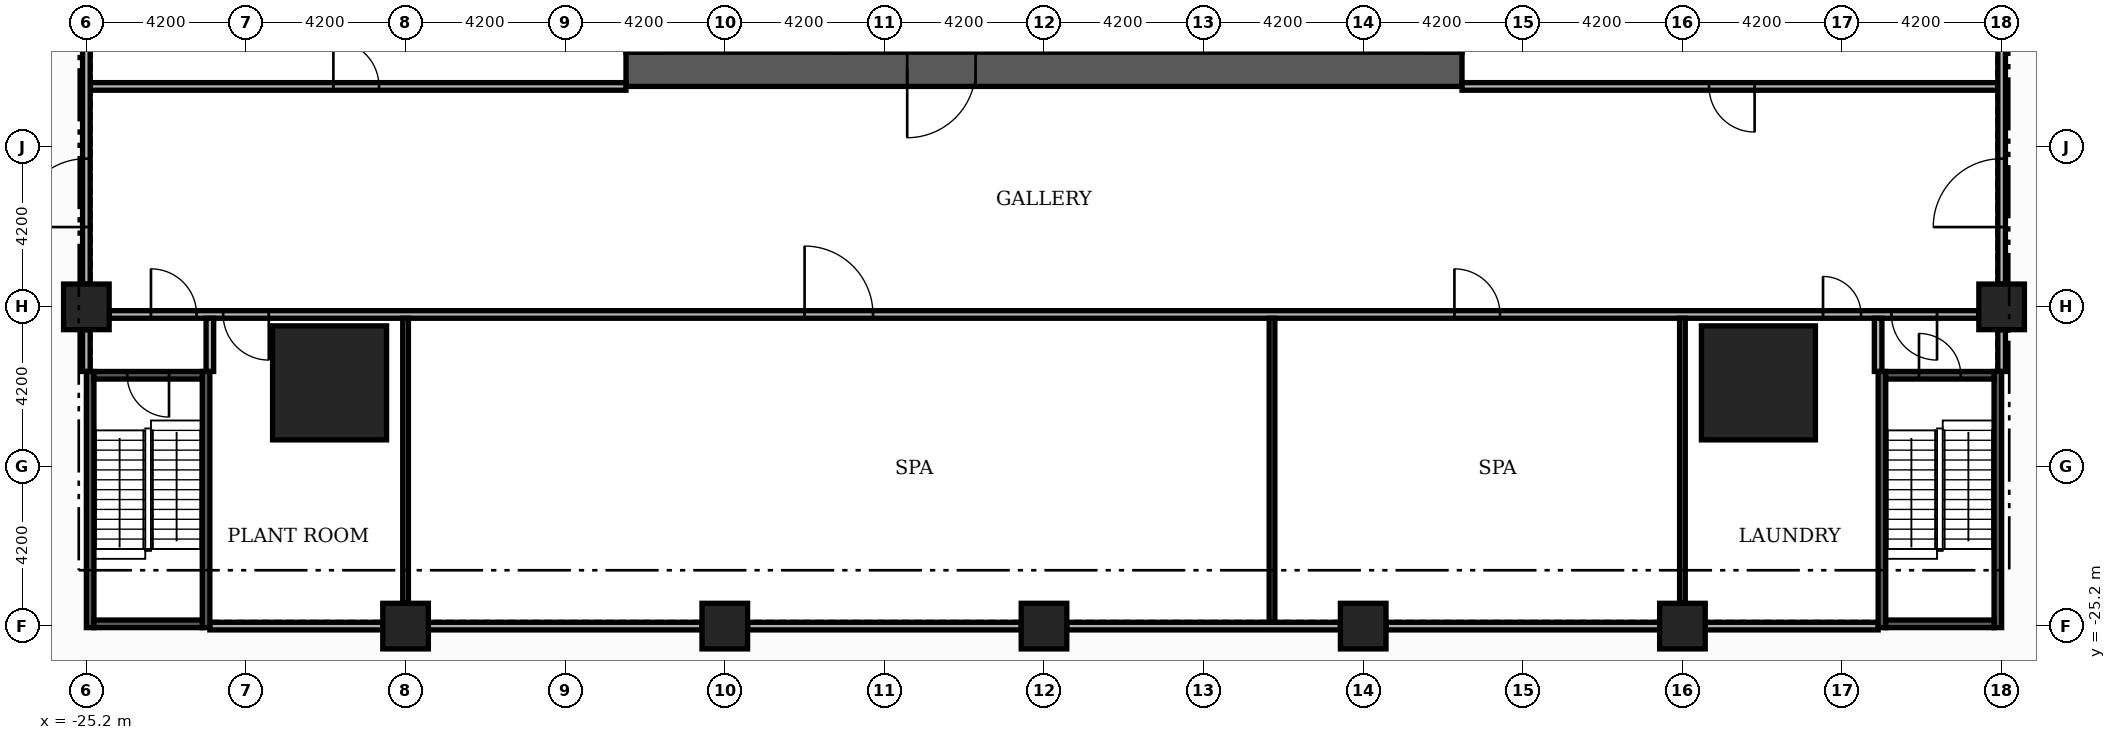
"""IFC4 building model, lengths in metres.
Left out: names, types, materials, properties, quantities, classifications, styles, units other than length and angle.
Written with IfcOpenShell. Run it as: python <this file> out.ifc"""

import sys

from ifc_helpers import new_model, si_unit, direction, frame, frame_2d, origin, origin_2d, place, context, subcontext, project, spatial, rectangle, extrude, element, fill, save


model = new_model("IFC4")
c1 = context("Model", 3, precision=1e-05, world=origin(), true_north=direction((0.0, 1.0)))
c2 = subcontext(c1, "Body", "Model", "MODEL_VIEW")
j1 = project(units=[si_unit("LENGTHUNIT", "METRE"), si_unit("PLANEANGLEUNIT", "RADIAN")], contexts=[c1])
p1 = place(None, origin())
s1 = spatial("IfcSite", under=j1, at=p1, CompositionType="ELEMENT")
p2 = place(p1, origin())
s2 = spatial("IfcBuilding", under=s1, at=p2, CompositionType="ELEMENT")
p3 = place(p2, frame((0.0, 0.0, 12.0)))
s3 = spatial("IfcBuildingStorey", under=s2, at=p3, CompositionType="ELEMENT", Elevation=12.0)
p4 = place(p3, frame((-11.0, -10.55, 0.0), z_axis=(0.0, 0.0, 1.0), x_axis=(1.0, 0.0, 0.0)))
e1 = element("IfcWall", 1, at=p4, inside=s3, PredefinedType="SHEAR", context=c2, shape_type="SweptSolid", body=[
    extrude(rectangle(XDim=22.0, YDim=0.9, at=frame_2d((11.0, 0.0))), origin(), (0.0, 0.0, 1.0), 4.38),
])
p5 = place(p4, frame((7.4, 0.0, 0.0)))
e2 = element("IfcOpeningElement", 2, at=p5, cuts=e1, PredefinedType="OPENING", context=c2, shape_type="SweptSolid", body=[
    extrude(rectangle(XDim=1.8, YDim=2.2, at=frame_2d((0.9, 1.1))), frame((0.0, 0.46, 0.0), z_axis=(0.0, -1.0, 0.0), x_axis=(1.0, 0.0, 0.0)), (0.0, 0.0, 1.0), 0.92),
])
for number, where, z_axis, x_axis in (
    (3, (18.8, -18.8, 0.0), (0.0, 0.0, 1.0), (1.0, 0.0, 0.0)),
    (4, (-18.8, -18.8, 0.0), (0.0, 0.0, 1.0), (1.0, 0.0, 0.0)),
):
    element("IfcColumn", number, at=place(p3, frame(where, z_axis=z_axis, x_axis=x_axis)), inside=s3, PredefinedType="COLUMN", context=c2, shape_type="SweptSolid", body=[
        extrude(rectangle(XDim=3.0, YDim=3.0, at=origin_2d()), origin(), (0.0, 0.0, 1.0), 4.8),
    ])
for number, where, z_axis, x_axis in (
    (5, (25.2, -16.8, 0.0), (0.0, 0.0, 1.0), (1.0, 0.0, 0.0)),
    (6, (0.0, -25.2, 0.0), (0.0, 0.0, 1.0), (1.0, 0.0, 0.0)),
    (7, (8.4, -25.2, 0.0), (0.0, 0.0, 1.0), (1.0, 0.0, 0.0)),
    (8, (16.8, -25.2, 0.0), (0.0, 0.0, 1.0), (1.0, 0.0, 0.0)),
    (9, (-8.4, -25.2, 0.0), (0.0, 0.0, 1.0), (1.0, 0.0, 0.0)),
    (10, (-16.8, -25.2, 0.0), (0.0, 0.0, 1.0), (1.0, 0.0, 0.0)),
    (11, (-25.2, -16.8, 0.0), (0.0, 0.0, 1.0), (1.0, 0.0, 0.0)),
):
    element("IfcColumn", number, at=place(p3, frame(where, z_axis=z_axis, x_axis=x_axis)), inside=s3, PredefinedType="COLUMN", context=c2, shape_type="SweptSolid", body=[
        extrude(rectangle(XDim=1.2, YDim=1.2, at=origin_2d()), origin(), (0.0, 0.0, 1.0), 4.8),
    ])
p6 = place(p3, frame((-21.95, -25.2, 0.0), z_axis=(0.0, 0.0, 1.0), x_axis=(1.0, 0.0, 0.0)))
e12 = element("IfcWall", 12, at=p6, inside=s3, PredefinedType="PARTITIONING", context=c2, shape_type="SweptSolid", body=[
    extrude(rectangle(XDim=4.55, YDim=0.2, at=frame_2d((2.275, 0.0))), origin(), (0.0, 0.0, 1.0), 4.18),
])
for number, where, z_axis, x_axis in (
    (13, (-16.2, -25.2, 0.0), (0.0, 0.0, 1.0), (1.0, 0.0, 0.0)),
    (14, (-7.8, -25.2, 0.0), (0.0, 0.0, 1.0), (1.0, 0.0, 0.0)),
    (15, (0.6, -25.2, 0.0), (0.0, 0.0, 1.0), (1.0, 0.0, 0.0)),
    (16, (9.0, -25.2, 0.0), (0.0, 0.0, 1.0), (1.0, 0.0, 0.0)),
):
    element("IfcWall", number, at=place(p3, frame(where, z_axis=z_axis, x_axis=x_axis)), inside=s3, PredefinedType="PARTITIONING", context=c2, shape_type="SweptSolid", body=[
        extrude(rectangle(XDim=7.2, YDim=0.2, at=frame_2d((3.6, 0.0))), origin(), (0.0, 0.0, 1.0), 4.18),
    ])
p7 = place(p3, frame((17.4, -25.2, 0.0), z_axis=(0.0, 0.0, 1.0), x_axis=(1.0, 0.0, 0.0)))
e17 = element("IfcWall", 17, at=p7, inside=s3, PredefinedType="PARTITIONING", context=c2, shape_type="SweptSolid", body=[
    extrude(rectangle(XDim=4.55, YDim=0.2, at=frame_2d((2.275, 0.0))), origin(), (0.0, 0.0, 1.0), 4.18),
])
p8 = place(p3, frame((-24.6, -17.0, 0.0), z_axis=(0.0, 0.0, 1.0), x_axis=(1.0, 0.0, 0.0)))
e18 = element("IfcWall", 18, at=p8, inside=s3, PredefinedType="PARTITIONING", context=c2, shape_type="SweptSolid", body=[
    extrude(rectangle(XDim=49.2, YDim=0.2, at=frame_2d((24.6, 0.0))), origin(), (0.0, 0.0, 1.0), 4.38),
])
p9 = place(p8, frame((1.1, 0.0, 0.0)))
e19 = element("IfcOpeningElement", 19, at=p9, cuts=e18, PredefinedType="OPENING", context=c2, shape_type="SweptSolid", body=[
    extrude(rectangle(XDim=1.2, YDim=2.2, at=frame_2d((0.6, 1.1))), frame((0.0, 0.11, 0.0), z_axis=(0.0, -1.0, 0.0), x_axis=(1.0, 0.0, 0.0)), (0.0, 0.0, 1.0), 0.22),
])
p10 = place(p8, frame((3.0, 0.0, 0.0)))
e20 = element("IfcOpeningElement", 20, at=p10, cuts=e18, PredefinedType="OPENING", context=c2, shape_type="SweptSolid", body=[
    extrude(rectangle(XDim=1.2, YDim=2.2, at=frame_2d((0.6, 1.1))), frame((0.0, 0.11, 0.0), z_axis=(0.0, -1.0, 0.0), x_axis=(1.0, 0.0, 0.0)), (0.0, 0.0, 1.0), 0.22),
])
p11 = place(p8, frame((18.3, 0.0, 0.0)))
e21 = element("IfcOpeningElement", 21, at=p11, cuts=e18, PredefinedType="OPENING", context=c2, shape_type="SweptSolid", body=[
    extrude(rectangle(XDim=1.8, YDim=2.2, at=frame_2d((0.9, 1.1))), frame((0.0, 0.11, 0.0), z_axis=(0.0, -1.0, 0.0), x_axis=(1.0, 0.0, 0.0)), (0.0, 0.0, 1.0), 0.22),
])
p12 = place(p8, frame((35.4, 0.0, 0.0)))
e22 = element("IfcOpeningElement", 22, at=p12, cuts=e18, PredefinedType="OPENING", context=c2, shape_type="SweptSolid", body=[
    extrude(rectangle(XDim=1.2, YDim=2.2, at=frame_2d((0.6, 1.1))), frame((0.0, 0.11, 0.0), z_axis=(0.0, -1.0, 0.0), x_axis=(1.0, 0.0, 0.0)), (0.0, 0.0, 1.0), 0.22),
])
p13 = place(p8, frame((45.1, 0.0, 0.0)))
e23 = element("IfcOpeningElement", 23, at=p13, cuts=e18, PredefinedType="OPENING", context=c2, shape_type="SweptSolid", body=[
    extrude(rectangle(XDim=1.0, YDim=2.1, at=frame_2d((0.5, 1.05))), frame((0.0, 0.11, 0.0), z_axis=(0.0, -1.0, 0.0), x_axis=(1.0, 0.0, 0.0)), (0.0, 0.0, 1.0), 0.22),
])
p14 = place(p8, frame((46.9, 0.0, 0.0)))
e24 = element("IfcOpeningElement", 24, at=p14, cuts=e18, PredefinedType="OPENING", context=c2, shape_type="SweptSolid", body=[
    extrude(rectangle(XDim=1.2, YDim=2.2, at=frame_2d((0.6, 1.1))), frame((0.0, 0.11, 0.0), z_axis=(0.0, -1.0, 0.0), x_axis=(1.0, 0.0, 0.0)), (0.0, 0.0, 1.0), 0.22),
])
p15 = place(p3, frame((-25.1, -11.0, 0.0), z_axis=(0.0, 0.0, 1.0), x_axis=(1.0, 0.0, 0.0)))
e25 = element("IfcWall", 25, at=p15, inside=s3, PredefinedType="PARTITIONING", context=c2, shape_type="SweptSolid", body=[
    extrude(rectangle(XDim=14.1, YDim=0.2, at=frame_2d((7.05, 0.0))), origin(), (0.0, 0.0, 1.0), 4.38),
])
p16 = place(p15, frame((6.4, 0.0, 0.0)))
e26 = element("IfcOpeningElement", 26, at=p16, cuts=e25, PredefinedType="OPENING", context=c2, shape_type="SweptSolid", body=[
    extrude(rectangle(XDim=1.2, YDim=2.2, at=frame_2d((0.6, 1.1))), frame((0.0, 0.11, 0.0), z_axis=(0.0, -1.0, 0.0), x_axis=(1.0, 0.0, 0.0)), (0.0, 0.0, 1.0), 0.22),
])
p17 = place(p3, frame((11.0, -11.0, 0.0), z_axis=(0.0, 0.0, 1.0), x_axis=(1.0, 0.0, 0.0)))
e27 = element("IfcWall", 27, at=p17, inside=s3, PredefinedType="PARTITIONING", context=c2, shape_type="SweptSolid", body=[
    extrude(rectangle(XDim=14.1, YDim=0.2, at=frame_2d((7.05, 0.0))), origin(), (0.0, 0.0, 1.0), 4.38),
])
p18 = place(p17, frame((6.5, 0.0, 0.0)))
e28 = element("IfcOpeningElement", 28, at=p18, cuts=e27, PredefinedType="OPENING", context=c2, shape_type="SweptSolid", body=[
    extrude(rectangle(XDim=1.2, YDim=2.2, at=frame_2d((0.6, 1.1))), frame((0.0, 0.11, 0.0), z_axis=(0.0, -1.0, 0.0), x_axis=(1.0, 0.0, 0.0)), (0.0, 0.0, 1.0), 0.22),
])
p19 = place(p3, frame((-25.2, -18.5, 0.0), z_axis=(0.0, 0.0, 1.0), x_axis=(0.0, 1.0, 0.0)))
e29 = element("IfcWall", 29, at=p19, inside=s3, PredefinedType="PARTITIONING", context=c2, shape_type="SweptSolid", body=[
    extrude(rectangle(XDim=1.1, YDim=0.2, at=frame_2d((0.55, 0.0))), origin(), (0.0, 0.0, 1.0), 4.08),
])
p20 = place(p3, frame((-25.2, -16.2, 0.0), z_axis=(0.0, 0.0, 1.0), x_axis=(0.0, 1.0, 0.0)))
e30 = element("IfcWall", 30, at=p20, inside=s3, PredefinedType="PARTITIONING", context=c2, shape_type="SweptSolid", body=[
    extrude(rectangle(XDim=7.2, YDim=0.2, at=frame_2d((3.6, 0.0))), origin(), (0.0, 0.0, 1.0), 4.08),
])
p21 = place(p20, frame((1.5, 0.0, 0.0)))
e31 = element("IfcOpeningElement", 31, at=p21, cuts=e30, PredefinedType="OPENING", context=c2, shape_type="SweptSolid", body=[
    extrude(rectangle(XDim=1.8, YDim=2.2, at=frame_2d((0.9, 1.1))), frame((0.0, 0.11, 0.0), z_axis=(0.0, -1.0, 0.0), x_axis=(1.0, 0.0, 0.0)), (0.0, 0.0, 1.0), 0.22),
])
p22 = place(p3, frame((-21.95, -18.5, 0.0), z_axis=(0.0, 0.0, 1.0), x_axis=(0.0, 1.0, 0.0)))
e32 = element("IfcWall", 32, at=p22, inside=s3, PredefinedType="PARTITIONING", context=c2, shape_type="SweptSolid", body=[
    extrude(rectangle(XDim=1.4, YDim=0.2, at=frame_2d((0.7, 0.0))), origin(), (0.0, 0.0, 1.0), 4.38),
])
p23 = place(p3, frame((-16.8, -24.6, 0.0), z_axis=(0.0, 0.0, 1.0), x_axis=(0.0, 1.0, 0.0)))
e33 = element("IfcWall", 33, at=p23, inside=s3, PredefinedType="PARTITIONING", context=c2, shape_type="SweptSolid", body=[
    extrude(rectangle(XDim=7.5, YDim=0.15, at=frame_2d((3.75, 0.0))), origin(), (0.0, 0.0, 1.0), 4.38),
])
p24 = place(p3, frame((6.0, -25.1, 0.0), z_axis=(0.0, 0.0, 1.0), x_axis=(0.0, 1.0, 0.0)))
e34 = element("IfcWall", 34, at=p24, inside=s3, PredefinedType="PARTITIONING", context=c2, shape_type="SweptSolid", body=[
    extrude(rectangle(XDim=8.0, YDim=0.15, at=frame_2d((4.0, 0.0))), origin(), (0.0, 0.0, 1.0), 4.38),
])
p25 = place(p3, frame((16.8, -24.6, 0.0), z_axis=(0.0, 0.0, 1.0), x_axis=(0.0, 1.0, 0.0)))
e35 = element("IfcWall", 35, at=p25, inside=s3, PredefinedType="PARTITIONING", context=c2, shape_type="SweptSolid", body=[
    extrude(rectangle(XDim=7.5, YDim=0.15, at=frame_2d((3.75, 0.0))), origin(), (0.0, 0.0, 1.0), 4.38),
])
p26 = place(p3, frame((21.95, -18.5, 0.0), z_axis=(0.0, 0.0, 1.0), x_axis=(0.0, 1.0, 0.0)))
e36 = element("IfcWall", 36, at=p26, inside=s3, PredefinedType="PARTITIONING", context=c2, shape_type="SweptSolid", body=[
    extrude(rectangle(XDim=1.4, YDim=0.2, at=frame_2d((0.7, 0.0))), origin(), (0.0, 0.0, 1.0), 4.38),
])
p27 = place(p3, frame((25.2, -18.5, 0.0), z_axis=(0.0, 0.0, 1.0), x_axis=(0.0, 1.0, 0.0)))
e37 = element("IfcWall", 37, at=p27, inside=s3, PredefinedType="PARTITIONING", context=c2, shape_type="SweptSolid", body=[
    extrude(rectangle(XDim=1.1, YDim=0.2, at=frame_2d((0.55, 0.0))), origin(), (0.0, 0.0, 1.0), 4.08),
])
p28 = place(p3, frame((25.2, -16.2, 0.0), z_axis=(0.0, 0.0, 1.0), x_axis=(0.0, 1.0, 0.0)))
e38 = element("IfcWall", 38, at=p28, inside=s3, PredefinedType="PARTITIONING", context=c2, shape_type="SweptSolid", body=[
    extrude(rectangle(XDim=7.2, YDim=0.2, at=frame_2d((3.6, 0.0))), origin(), (0.0, 0.0, 1.0), 4.08),
])
p29 = place(p28, frame((1.5, 0.0, 0.0)))
e39 = element("IfcOpeningElement", 39, at=p29, cuts=e38, PredefinedType="OPENING", context=c2, shape_type="SweptSolid", body=[
    extrude(rectangle(XDim=1.8, YDim=2.2, at=frame_2d((0.9, 1.1))), frame((0.0, 0.11, 0.0), z_axis=(0.0, -1.0, 0.0), x_axis=(1.0, 0.0, 0.0)), (0.0, 0.0, 1.0), 0.22),
])
p30 = place(p3, frame((22.05, -25.24, 0.0), z_axis=(0.0, 0.0, 1.0), x_axis=(0.0, 1.0, 0.0)))
e40 = element("IfcWall", 40, at=p30, inside=s3, PredefinedType="SOLIDWALL", context=c2, shape_type="SweptSolid", body=[
    extrude(rectangle(XDim=6.74, YDim=0.2, at=frame_2d((3.37, 0.0))), origin(), (0.0, 0.0, 1.0), 4.38),
])
p31 = place(p3, frame((25.1, -25.24, 0.0), z_axis=(0.0, 0.0, 1.0), x_axis=(0.0, 1.0, 0.0)))
e41 = element("IfcWall", 41, at=p31, inside=s3, PredefinedType="SOLIDWALL", context=c2, shape_type="SweptSolid", body=[
    extrude(rectangle(XDim=6.74, YDim=0.2, at=frame_2d((3.37, 0.0))), origin(), (0.0, 0.0, 1.0), 4.08),
])
p32 = place(p3, frame((22.15, -25.14, 0.0), z_axis=(0.0, 0.0, 1.0), x_axis=(1.0, 0.0, 0.0)))
e42 = element("IfcWall", 42, at=p32, inside=s3, PredefinedType="SOLIDWALL", context=c2, shape_type="SweptSolid", body=[
    extrude(rectangle(XDim=2.85, YDim=0.2, at=frame_2d((1.425, 0.0))), origin(), (0.0, 0.0, 1.0), 4.18),
])
p33 = place(p3, frame((22.15, -18.6, 0.0), z_axis=(0.0, 0.0, 1.0), x_axis=(1.0, 0.0, 0.0)))
e43 = element("IfcWall", 43, at=p33, inside=s3, PredefinedType="SOLIDWALL", context=c2, shape_type="SweptSolid", body=[
    extrude(rectangle(XDim=2.85, YDim=0.2, at=frame_2d((1.425, 0.0))), origin(), (0.0, 0.0, 1.0), 4.38),
])
p34 = place(p33, frame((0.875, 0.0, 0.0)))
e44 = element("IfcOpeningElement", 44, at=p34, cuts=e43, PredefinedType="OPENING", context=c2, shape_type="SweptSolid", body=[
    extrude(rectangle(XDim=1.1, YDim=2.2, at=frame_2d((0.55, 1.1))), frame((0.0, 0.11, 0.0), z_axis=(0.0, -1.0, 0.0), x_axis=(1.0, 0.0, 0.0)), (0.0, 0.0, 1.0), 0.22),
])
p35 = place(p3, frame((-25.1, -25.24, 0.0), z_axis=(0.0, 0.0, 1.0), x_axis=(0.0, 1.0, 0.0)))
e45 = element("IfcWall", 45, at=p35, inside=s3, PredefinedType="SOLIDWALL", context=c2, shape_type="SweptSolid", body=[
    extrude(rectangle(XDim=6.74, YDim=0.2, at=frame_2d((3.37, 0.0))), origin(), (0.0, 0.0, 1.0), 4.08),
])
p36 = place(p3, frame((-22.05, -25.24, 0.0), z_axis=(0.0, 0.0, 1.0), x_axis=(0.0, 1.0, 0.0)))
e46 = element("IfcWall", 46, at=p36, inside=s3, PredefinedType="SOLIDWALL", context=c2, shape_type="SweptSolid", body=[
    extrude(rectangle(XDim=6.74, YDim=0.2, at=frame_2d((3.37, 0.0))), origin(), (0.0, 0.0, 1.0), 4.38),
])
p37 = place(p3, frame((-25.0, -25.14, 0.0), z_axis=(0.0, 0.0, 1.0), x_axis=(1.0, 0.0, 0.0)))
e47 = element("IfcWall", 47, at=p37, inside=s3, PredefinedType="SOLIDWALL", context=c2, shape_type="SweptSolid", body=[
    extrude(rectangle(XDim=2.85, YDim=0.2, at=frame_2d((1.425, 0.0))), origin(), (0.0, 0.0, 1.0), 4.18),
])
p38 = place(p3, frame((-25.0, -18.6, 0.0), z_axis=(0.0, 0.0, 1.0), x_axis=(1.0, 0.0, 0.0)))
e48 = element("IfcWall", 48, at=p38, inside=s3, PredefinedType="SOLIDWALL", context=c2, shape_type="SweptSolid", body=[
    extrude(rectangle(XDim=2.85, YDim=0.2, at=frame_2d((1.425, 0.0))), origin(), (0.0, 0.0, 1.0), 4.38),
])
p39 = place(p38, frame((0.875, 0.0, 0.0)))
e49 = element("IfcOpeningElement", 49, at=p39, cuts=e48, PredefinedType="OPENING", context=c2, shape_type="SweptSolid", body=[
    extrude(rectangle(XDim=1.1, YDim=2.2, at=frame_2d((0.55, 1.1))), frame((0.0, 0.11, 0.0), z_axis=(0.0, -1.0, 0.0), x_axis=(1.0, 0.0, 0.0)), (0.0, 0.0, 1.0), 0.22),
])
p40 = place(p5, frame((1.8, 0.0, 0.0), z_axis=(0.0, 0.0, 1.0), x_axis=(-1.0, 0.0, 0.0)))
e50 = element("IfcDoor", 50, at=p40, inside=s3, OperationType="DOUBLE_DOOR_SINGLE_SWING", PredefinedType="DOOR", context=c2, shape_type="SweptSolid", body=[
    extrude(rectangle(XDim=1.8, YDim=2.2, at=frame_2d((0.9, 1.1))), frame((0.0, 0.025, 0.0), z_axis=(0.0, -1.0, 0.0), x_axis=(1.0, 0.0, 0.0)), (0.0, 0.0, 1.0), 0.05),
])
fill(e2, e50)
p41 = place(p9, origin())
e51 = element("IfcDoor", 51, at=p41, inside=s3, OperationType="SINGLE_SWING_LEFT", PredefinedType="DOOR", context=c2, shape_type="SweptSolid", body=[
    extrude(rectangle(XDim=1.2, YDim=2.2, at=frame_2d((0.6, 1.1))), frame((0.0, 0.025, 0.0), z_axis=(0.0, -1.0, 0.0), x_axis=(1.0, 0.0, 0.0)), (0.0, 0.0, 1.0), 0.05),
])
fill(e19, e51)
p42 = place(p10, origin())
e52 = element("IfcDoor", 52, at=p42, inside=s3, OperationType="SINGLE_SWING_RIGHT", PredefinedType="DOOR", context=c2, shape_type="SweptSolid", body=[
    extrude(rectangle(XDim=1.2, YDim=2.2, at=frame_2d((0.6, 1.1))), frame((0.0, 0.025, 0.0), z_axis=(0.0, -1.0, 0.0), x_axis=(1.0, 0.0, 0.0)), (0.0, 0.0, 1.0), 0.05),
])
fill(e20, e52)
p43 = place(p11, origin())
e53 = element("IfcDoor", 53, at=p43, inside=s3, OperationType="DOUBLE_DOOR_SINGLE_SWING", PredefinedType="DOOR", context=c2, shape_type="SweptSolid", body=[
    extrude(rectangle(XDim=1.8, YDim=2.2, at=frame_2d((0.9, 1.1))), frame((0.0, 0.025, 0.0), z_axis=(0.0, -1.0, 0.0), x_axis=(1.0, 0.0, 0.0)), (0.0, 0.0, 1.0), 0.05),
])
fill(e21, e53)
p44 = place(p12, origin())
e54 = element("IfcDoor", 54, at=p44, inside=s3, OperationType="SINGLE_SWING_LEFT", PredefinedType="DOOR", context=c2, shape_type="SweptSolid", body=[
    extrude(rectangle(XDim=1.2, YDim=2.2, at=frame_2d((0.6, 1.1))), frame((0.0, 0.025, 0.0), z_axis=(0.0, -1.0, 0.0), x_axis=(1.0, 0.0, 0.0)), (0.0, 0.0, 1.0), 0.05),
])
fill(e22, e54)
p45 = place(p13, origin())
e55 = element("IfcDoor", 55, at=p45, inside=s3, OperationType="SINGLE_SWING_LEFT", PredefinedType="DOOR", context=c2, shape_type="SweptSolid", body=[
    extrude(rectangle(XDim=1.0, YDim=2.1, at=frame_2d((0.5, 1.05))), frame((0.0, 0.025, 0.0), z_axis=(0.0, -1.0, 0.0), x_axis=(1.0, 0.0, 0.0)), (0.0, 0.0, 1.0), 0.05),
])
fill(e23, e55)
p46 = place(p14, origin())
e56 = element("IfcDoor", 56, at=p46, inside=s3, OperationType="SINGLE_SWING_RIGHT", PredefinedType="DOOR", context=c2, shape_type="SweptSolid", body=[
    extrude(rectangle(XDim=1.2, YDim=2.2, at=frame_2d((0.6, 1.1))), frame((0.0, 0.025, 0.0), z_axis=(0.0, -1.0, 0.0), x_axis=(1.0, 0.0, 0.0)), (0.0, 0.0, 1.0), 0.05),
])
fill(e24, e56)
p47 = place(p21, origin())
e57 = element("IfcDoor", 57, at=p47, inside=s3, OperationType="DOUBLE_DOOR_SINGLE_SWING", PredefinedType="DOOR", context=c2, shape_type="SweptSolid", body=[
    extrude(rectangle(XDim=1.8, YDim=2.2, at=frame_2d((0.9, 1.1))), frame((0.0, 0.025, 0.0), z_axis=(0.0, -1.0, 0.0), x_axis=(1.0, 0.0, 0.0)), (0.0, 0.0, 1.0), 0.05),
])
fill(e31, e57)
p48 = place(p29, origin())
e58 = element("IfcDoor", 58, at=p48, inside=s3, OperationType="DOUBLE_DOOR_SINGLE_SWING", PredefinedType="DOOR", context=c2, shape_type="SweptSolid", body=[
    extrude(rectangle(XDim=1.8, YDim=2.2, at=frame_2d((0.9, 1.1))), frame((0.0, 0.025, 0.0), z_axis=(0.0, -1.0, 0.0), x_axis=(1.0, 0.0, 0.0)), (0.0, 0.0, 1.0), 0.05),
])
fill(e39, e58)
p49 = place(p16, origin())
e59 = element("IfcDoor", 59, at=p49, inside=s3, OperationType="SINGLE_SWING_LEFT", PredefinedType="DOOR", context=c2, shape_type="SweptSolid", body=[
    extrude(rectangle(XDim=1.2, YDim=2.2, at=frame_2d((0.6, 1.1))), frame((0.0, 0.025, 0.0), z_axis=(0.0, -1.0, 0.0), x_axis=(1.0, 0.0, 0.0)), (0.0, 0.0, 1.0), 0.05),
])
fill(e26, e59)
p50 = place(p18, origin())
e60 = element("IfcDoor", 60, at=p50, inside=s3, OperationType="SINGLE_SWING_RIGHT", PredefinedType="DOOR", context=c2, shape_type="SweptSolid", body=[
    extrude(rectangle(XDim=1.2, YDim=2.2, at=frame_2d((0.6, 1.1))), frame((0.0, 0.025, 0.0), z_axis=(0.0, -1.0, 0.0), x_axis=(1.0, 0.0, 0.0)), (0.0, 0.0, 1.0), 0.05),
])
fill(e28, e60)
p51 = place(p34, origin())
e61 = element("IfcDoor", 61, at=p51, inside=s3, OperationType="SINGLE_SWING_LEFT", PredefinedType="DOOR", context=c2, shape_type="SweptSolid", body=[
    extrude(rectangle(XDim=1.1, YDim=2.2, at=frame_2d((0.55, 1.1))), frame((0.0, 0.025, 0.0), z_axis=(0.0, -1.0, 0.0), x_axis=(1.0, 0.0, 0.0)), (0.0, 0.0, 1.0), 0.05),
])
fill(e44, e61)
p52 = place(p39, origin())
e62 = element("IfcDoor", 62, at=p52, inside=s3, OperationType="SINGLE_SWING_RIGHT", PredefinedType="DOOR", context=c2, shape_type="SweptSolid", body=[
    extrude(rectangle(XDim=1.1, YDim=2.2, at=frame_2d((0.55, 1.1))), frame((0.0, 0.025, 0.0), z_axis=(0.0, -1.0, 0.0), x_axis=(1.0, 0.0, 0.0)), (0.0, 0.0, 1.0), 0.05),
])
fill(e49, e62)
save(model, sys.argv[1])
